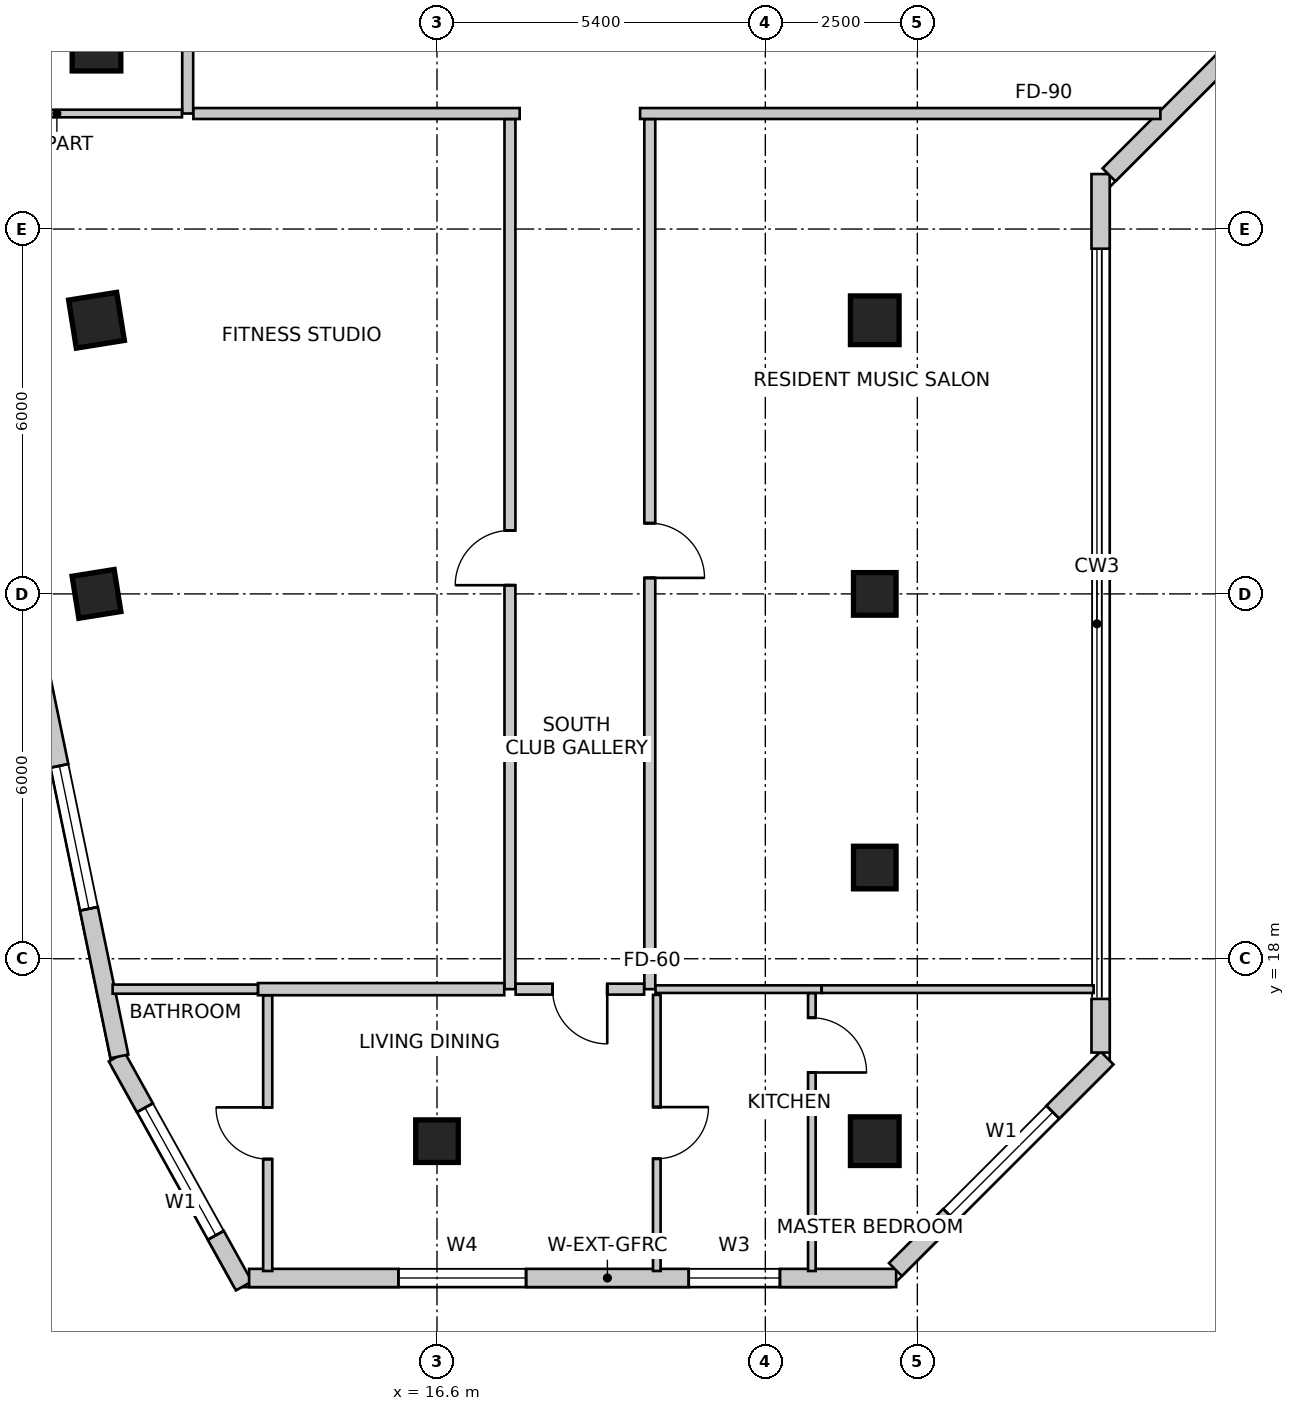
"""IFC4 building model, lengths in metres.
Left out: names, types, materials, properties, quantities, classifications, styles, units other than length and angle.
Written with IfcOpenShell. Run it as: python <this file> out.ifc"""

import sys

from ifc_helpers import new_model, si_unit, direction, frame, frame_2d, origin, origin_2d, place, context, subcontext, project, spatial, rectangle, extrude, source, transform, mapped, element, fill, save


model = new_model("IFC4")
c1 = context("Model", 3, precision=1e-05, world=origin(), true_north=direction((0.0, 1.0)))
c2 = subcontext(c1, "Body", "Model", "MODEL_VIEW")
j1 = project(units=[si_unit("LENGTHUNIT", "METRE"), si_unit("PLANEANGLEUNIT", "RADIAN")], contexts=[c1])
p1 = place(None, origin())
s1 = spatial("IfcSite", under=j1, at=p1, CompositionType="ELEMENT")
p2 = place(p1, origin())
s2 = spatial("IfcBuilding", under=s1, at=p2, CompositionType="ELEMENT")
p3 = place(p2, frame((0.0, 0.0, 232.4)))
s3 = spatial("IfcBuildingStorey", under=s2, at=p3, CompositionType="ELEMENT", Elevation=232.4)
m1 = source(origin(), c2, "Body", "SweptSolid", [
    extrude(rectangle(XDim=0.8, YDim=0.8, at=origin_2d()), origin(), (0.0, 0.0, 1.0), 3.5),
])
for number, where, z_axis, x_axis in (
    (1, (11.0, 33.0, 0.0), (0.0, 0.0, 1.0), (1.0, 0.0, 0.0)),
    (2, (11.0, 28.5, 0.0), (0.0, 0.0, 1.0), (0.158, -0.987, 0.0)),
):
    element("IfcColumn", number, at=place(p3, frame(where, z_axis=z_axis, x_axis=x_axis)), inside=s3, PredefinedType="COLUMN", context=c2, shape_type="MappedRepresentation", body=[
        mapped(m1, transform((0.0, 0.0, 0.0), scale=1.0)),
    ])
m2 = source(origin(), c2, "Body", "SweptSolid", [
    extrude(rectangle(XDim=0.7, YDim=0.7, at=origin_2d()), origin(), (0.0, 0.0, 1.0), 3.5),
])
p4 = place(p3, frame((11.0, 24.0, 0.0), z_axis=(0.0, 0.0, 1.0), x_axis=(0.158158067254, -0.987413806751, 0.0)))
e3 = element("IfcColumn", 3, at=p4, inside=s3, PredefinedType="COLUMN", context=c2, shape_type="MappedRepresentation", body=[
    mapped(m2, transform((0.0, 0.0, 0.0), scale=1.0)),
])
p5 = place(p3, frame((23.8, 28.5, 0.0), z_axis=(0.0, 0.0, 1.0), x_axis=(1.0, 0.0, 0.0)))
e4 = element("IfcColumn", 4, at=p5, inside=s3, PredefinedType="COLUMN", context=c2, shape_type="MappedRepresentation", body=[
    mapped(m1, transform((0.0, 0.0, 0.0), scale=1.0)),
])
for number, where, z_axis, x_axis in (
    (5, (23.8, 24.0, 0.0), (0.0, 0.0, 1.0), (1.0, 0.0, 0.0)),
    (6, (23.8, 19.5, 0.0), (0.0, 0.0, 1.0), (1.0, 0.0, 0.0)),
):
    element("IfcColumn", number, at=place(p3, frame(where, z_axis=z_axis, x_axis=x_axis)), inside=s3, PredefinedType="COLUMN", context=c2, shape_type="MappedRepresentation", body=[
        mapped(m2, transform((0.0, 0.0, 0.0), scale=1.0)),
    ])
p6 = place(p3, frame((23.8, 15.0, 0.0), z_axis=(0.0, 0.0, 1.0), x_axis=(1.0, 0.0, 0.0)))
e7 = element("IfcColumn", 7, at=p6, inside=s3, PredefinedType="COLUMN", context=c2, shape_type="MappedRepresentation", body=[
    mapped(m1, transform((0.0, 0.0, 0.0), scale=1.0)),
])
p7 = place(p3, frame((16.6, 15.0, 0.0), z_axis=(0.0, 0.0, 1.0), x_axis=(1.0, 0.0, 0.0)))
e8 = element("IfcColumn", 8, at=p7, inside=s3, PredefinedType="COLUMN", context=c2, shape_type="MappedRepresentation", body=[
    mapped(m2, transform((0.0, 0.0, 0.0), scale=1.0)),
])
p8 = place(p3, frame((11.333, 16.384, 0.0), z_axis=(0.0, 0.0, 1.0), x_axis=(0.485633305139, -0.874162623852, 0.0)))
e9 = element("IfcWall", 9, at=p8, inside=s3, PredefinedType="SOLIDWALL", context=c2, shape_type="SweptSolid", body=[
    extrude(rectangle(XDim=4.307, YDim=0.3, at=frame_2d((2.153, 0.0))), origin(), (0.0, 0.0, 1.0), 3.25),
])
m3 = source(origin(), c2, "Body", "SweptSolid", [
    extrude(rectangle(XDim=2.4, YDim=2.2, at=frame_2d((1.2, 1.1))), frame((0.0, 0.16, 0.0), z_axis=(0.0, -1.0, 0.0), x_axis=(1.0, 0.0, 0.0)), (0.0, 0.0, 1.0), 0.32),
])
p9 = place(p8, frame((0.954, 0.0, 0.85)))
e10 = element("IfcOpeningElement", 10, at=p9, cuts=e9, PredefinedType="OPENING", context=c2, shape_type="MappedRepresentation", body=[
    mapped(m3, transform((0.0, 0.0, 0.0), scale=1.0)),
])
p10 = place(p3, frame((13.51, 12.75, 0.0), z_axis=(0.0, 0.0, 1.0), x_axis=(1.0, 0.0, 0.0)))
e11 = element("IfcWall", 11, at=p10, inside=s3, PredefinedType="SOLIDWALL", context=c2, shape_type="SweptSolid", body=[
    extrude(rectangle(XDim=10.642, YDim=0.3, at=frame_2d((5.321, 0.0))), origin(), (0.0, 0.0, 1.0), 3.25),
])
m4 = source(origin(), c2, "Body", "SweptSolid", [
    extrude(rectangle(XDim=2.1, YDim=2.0, at=frame_2d((1.05, 1.0))), frame((0.0, 0.16, 0.0), z_axis=(0.0, -1.0, 0.0), x_axis=(1.0, 0.0, 0.0)), (0.0, 0.0, 1.0), 0.32),
])
p11 = place(p10, frame((2.455, 0.0, 0.85)))
e12 = element("IfcOpeningElement", 12, at=p11, cuts=e11, PredefinedType="OPENING", context=c2, shape_type="MappedRepresentation", body=[
    mapped(m4, transform((0.0, 0.0, 0.0), scale=1.0)),
])
m5 = source(origin(), c2, "Body", "SweptSolid", [
    extrude(rectangle(XDim=1.5, YDim=1.8, at=frame_2d((0.75, 0.9))), frame((0.0, 0.16, 0.0), z_axis=(0.0, -1.0, 0.0), x_axis=(1.0, 0.0, 0.0)), (0.0, 0.0, 1.0), 0.32),
])
p12 = place(p10, frame((7.23, 0.0, 0.85)))
e13 = element("IfcOpeningElement", 13, at=p12, cuts=e11, PredefinedType="OPENING", context=c2, shape_type="MappedRepresentation", body=[
    mapped(m5, transform((0.0, 0.0, 0.0), scale=1.0)),
])
p13 = place(p3, frame((24.14, 12.888, 0.0), z_axis=(0.0, 0.0, 1.0), x_axis=(0.707106781187, 0.707106781187, 0.0)))
e14 = element("IfcWall", 14, at=p13, inside=s3, PredefinedType="SOLIDWALL", context=c2, shape_type="SweptSolid", body=[
    extrude(rectangle(XDim=4.922, YDim=0.3, at=frame_2d((2.461, 0.0))), origin(), (0.0, 0.0, 1.0), 3.25),
])
p14 = place(p13, frame((1.261, 0.0, 0.85)))
e15 = element("IfcOpeningElement", 15, at=p14, cuts=e14, PredefinedType="OPENING", context=c2, shape_type="MappedRepresentation", body=[
    mapped(m3, transform((0.0, 0.0, 0.0), scale=1.0)),
])
p15 = place(p3, frame((27.514, 16.457, 0.0), z_axis=(0.0, 0.0, 1.0), x_axis=(0.0, 1.0, 0.0)))
e16 = element("IfcWall", 16, at=p15, inside=s3, PredefinedType="SOLIDWALL", context=c2, shape_type="SweptSolid", body=[
    extrude(rectangle(XDim=0.882, YDim=0.3, at=frame_2d((0.441, 0.0))), origin(), (0.0, 0.0, 1.0), 3.25),
])
p16 = place(p3, frame((27.514, 29.677, 0.0), z_axis=(0.0, 0.0, 1.0), x_axis=(0.0, 1.0, 0.0)))
e17 = element("IfcWall", 17, at=p16, inside=s3, PredefinedType="SOLIDWALL", context=c2, shape_type="SweptSolid", body=[
    extrude(rectangle(XDim=1.228, YDim=0.3, at=frame_2d((0.614, 0.0))), origin(), (0.0, 0.0, 1.0), 3.25),
])
p17 = place(p3, frame((27.652, 30.892, 0.0), z_axis=(0.0, 0.0, 1.0), x_axis=(0.707106781187, 0.707106781187, 0.0)))
e18 = element("IfcWall", 18, at=p17, inside=s3, PredefinedType="SOLIDWALL", context=c2, shape_type="SweptSolid", body=[
    extrude(rectangle(XDim=2.907, YDim=0.3, at=frame_2d((1.454, 0.0))), origin(), (0.0, 0.0, 1.0), 3.25),
])
p18 = place(p3, frame((13.269, 47.134, 0.0), z_axis=(0.0, 0.0, 1.0), x_axis=(-0.319920776449, -0.947444297464, 0.0)))
e19 = element("IfcWall", 19, at=p18, inside=s3, PredefinedType="SOLIDWALL", context=c2, shape_type="SweptSolid", body=[
    extrude(rectangle(XDim=16.133, YDim=0.3, at=frame_2d((8.067, 0.0))), origin(), (0.0, 0.0, 1.0), 3.25),
])
p19 = place(p18, frame((2.513, 0.0, 0.85)))
e20 = element("IfcOpeningElement", 20, at=p19, cuts=e19, PredefinedType="OPENING", context=c2, shape_type="MappedRepresentation", body=[
    mapped(m4, transform((0.0, 0.0, 0.0), scale=1.0)),
])
p20 = place(p18, frame((7.26, 0.0, 0.85)))
e21 = element("IfcOpeningElement", 21, at=p20, cuts=e19, PredefinedType="OPENING", context=c2, shape_type="MappedRepresentation", body=[
    mapped(m3, transform((0.0, 0.0, 0.0), scale=1.0)),
])
p21 = place(p18, frame((12.307, 0.0, 0.85)))
e22 = element("IfcOpeningElement", 22, at=p21, cuts=e19, PredefinedType="OPENING", context=c2, shape_type="MappedRepresentation", body=[
    mapped(m4, transform((0.0, 0.0, 0.0), scale=1.0)),
])
p22 = place(p3, frame((8.188, 31.834, 0.0), z_axis=(0.0, 0.0, 1.0), x_axis=(0.202303475707, -0.979322880217, 0.0)))
e23 = element("IfcWall", 23, at=p22, inside=s3, PredefinedType="SOLIDWALL", context=c2, shape_type="SweptSolid", body=[
    extrude(rectangle(XDim=15.766, YDim=0.3, at=frame_2d((7.883, 0.0))), origin(), (0.0, 0.0, 1.0), 3.25),
])
p23 = place(p22, frame((1.473, 0.0, 0.85)))
e24 = element("IfcOpeningElement", 24, at=p23, cuts=e23, PredefinedType="OPENING", context=c2, shape_type="MappedRepresentation", body=[
    mapped(m3, transform((0.0, 0.0, 0.0), scale=1.0)),
])
p24 = place(p22, frame((6.33, 0.0, 0.85)))
e25 = element("IfcOpeningElement", 25, at=p24, cuts=e23, PredefinedType="OPENING", context=c2, shape_type="MappedRepresentation", body=[
    mapped(m4, transform((0.0, 0.0, 0.0), scale=1.0)),
])
p25 = place(p22, frame((10.887, 0.0, 0.85)))
e26 = element("IfcOpeningElement", 26, at=p25, cuts=e23, PredefinedType="OPENING", context=c2, shape_type="MappedRepresentation", body=[
    mapped(m3, transform((0.0, 0.0, 0.0), scale=1.0)),
])
p26 = place(p3, frame((12.5, 31.9, 0.0), z_axis=(0.0, 0.0, 1.0), x_axis=(0.0, 1.0, 0.0)))
e27 = element("IfcWall", 27, at=p26, inside=s3, PredefinedType="PARTITIONING", context=c2, shape_type="SweptSolid", body=[
    extrude(rectangle(XDim=1.556, YDim=0.18, at=frame_2d((0.778, 0.0))), origin(), (0.0, 0.0, 1.0), 2.934),
])
p27 = place(p3, frame((17.96, 31.9, 0.0), z_axis=(0.0, 0.0, 1.0), x_axis=(-1.0, 0.0, 0.0)))
e28 = element("IfcWall", 28, at=p27, inside=s3, PredefinedType="PARTITIONING", context=c2, shape_type="SweptSolid", body=[
    extrude(rectangle(XDim=5.366, YDim=0.18, at=frame_2d((2.683, 0.0))), origin(), (0.0, 0.0, 1.0), 2.934),
])
p28 = place(p3, frame((28.497, 31.9, 0.0), z_axis=(0.0, 0.0, 1.0), x_axis=(-1.0, 0.0, 0.0)))
e29 = element("IfcWall", 29, at=p28, inside=s3, PredefinedType="PARTITIONING", context=c2, shape_type="SweptSolid", body=[
    extrude(rectangle(XDim=8.557, YDim=0.18, at=frame_2d((4.279, 0.0))), origin(), (0.0, 0.0, 1.0), 2.934),
])
p29 = place(p3, frame((12.406, 31.9, 0.0), z_axis=(0.0, 0.0, 1.0), x_axis=(-1.0, 0.0, 0.0)))
e30 = element("IfcWall", 30, at=p29, inside=s3, PredefinedType="PARTITIONING", context=c2, shape_type="SweptSolid", body=[
    extrude(rectangle(XDim=4.115, YDim=0.125, at=frame_2d((2.057, 0.0))), origin(), (0.0, 0.0, 1.0), 2.542),
])
p30 = place(p3, frame((17.8, 17.5, 0.0), z_axis=(0.0, 0.0, 1.0), x_axis=(0.0, 1.0, 0.0)))
e31 = element("IfcWall", 31, at=p30, inside=s3, PredefinedType="PARTITIONING", context=c2, shape_type="SweptSolid", body=[
    extrude(rectangle(XDim=14.306, YDim=0.18, at=frame_2d((7.153, 0.0))), origin(), (0.0, 0.0, 1.0), 2.766),
])
m6 = source(origin(), c2, "Body", "SweptSolid", [
    extrude(rectangle(XDim=0.9, YDim=2.15, at=frame_2d((0.45, 1.075))), frame((0.0, 0.1, 0.0), z_axis=(0.0, -1.0, 0.0), x_axis=(1.0, 0.0, 0.0)), (0.0, 0.0, 1.0), 0.2),
])
p31 = place(p30, frame((6.643, 0.0, 0.0)))
e32 = element("IfcOpeningElement", 32, at=p31, cuts=e31, PredefinedType="OPENING", context=c2, shape_type="MappedRepresentation", body=[
    mapped(m6, transform((0.0, 0.0, 0.0), scale=1.0)),
])
p32 = place(p3, frame((20.1, 31.806, 0.0), z_axis=(0.0, 0.0, 1.0), x_axis=(0.0, -1.0, 0.0)))
e33 = element("IfcWall", 33, at=p32, inside=s3, PredefinedType="PARTITIONING", context=c2, shape_type="SweptSolid", body=[
    extrude(rectangle(XDim=14.306, YDim=0.18, at=frame_2d((7.153, 0.0))), origin(), (0.0, 0.0, 1.0), 2.766),
])
p33 = place(p32, frame((6.643, 0.0, 0.0)))
e34 = element("IfcOpeningElement", 34, at=p33, cuts=e33, PredefinedType="OPENING", context=c2, shape_type="MappedRepresentation", body=[
    mapped(m6, transform((0.0, 0.0, 0.0), scale=1.0)),
])
p34 = place(p3, frame((20.006, 17.5, 0.0), z_axis=(0.0, 0.0, 1.0), x_axis=(-1.0, 0.0, 0.0)))
e35 = element("IfcWall", 35, at=p34, inside=s3, PredefinedType="PARTITIONING", context=c2, shape_type="SweptSolid", body=[
    extrude(rectangle(XDim=2.112, YDim=0.18, at=frame_2d((1.056, 0.0))), origin(), (0.0, 0.0, 1.0), 3.25),
])
p35 = place(p34, frame((0.606, 0.0, 0.0)))
e36 = element("IfcOpeningElement", 36, at=p35, cuts=e35, PredefinedType="OPENING", context=c2, shape_type="MappedRepresentation", body=[
    mapped(m6, transform((0.0, 0.0, 0.0), scale=1.0)),
])
p36 = place(p3, frame((17.706, 17.5, 0.0), z_axis=(0.0, 0.0, 1.0), x_axis=(-1.0, 0.0, 0.0)))
e37 = element("IfcWall", 37, at=p36, inside=s3, PredefinedType="PARTITIONING", context=c2, shape_type="SweptSolid", body=[
    extrude(rectangle(XDim=4.05, YDim=0.2, at=frame_2d((2.025, 0.0))), origin(), (0.0, 0.0, 1.0), 3.25),
])
p37 = place(p3, frame((13.654, 17.5, 0.0), z_axis=(0.0, 0.0, 1.0), x_axis=(-1.0, 0.0, 0.0)))
e38 = element("IfcWall", 38, at=p37, inside=s3, PredefinedType="PARTITIONING", context=c2, shape_type="SweptSolid", body=[
    extrude(rectangle(XDim=2.388, YDim=0.15, at=frame_2d((1.194, 0.0))), origin(), (0.0, 0.0, 1.0), 3.25),
])
p38 = place(p3, frame((22.925, 17.5, 0.0), z_axis=(0.0, 0.0, 1.0), x_axis=(-1.0, 0.0, 0.0)))
e39 = element("IfcWall", 39, at=p38, inside=s3, PredefinedType="PARTITIONING", context=c2, shape_type="SweptSolid", body=[
    extrude(rectangle(XDim=2.731, YDim=0.125, at=frame_2d((1.365, 0.0))), origin(), (0.0, 0.0, 1.0), 2.822),
])
p39 = place(p3, frame((27.399, 17.5, 0.0), z_axis=(0.0, 0.0, 1.0), x_axis=(-1.0, 0.0, 0.0)))
e40 = element("IfcWall", 40, at=p39, inside=s3, PredefinedType="PARTITIONING", context=c2, shape_type="SweptSolid", body=[
    extrude(rectangle(XDim=4.472, YDim=0.125, at=frame_2d((2.236, 0.0))), origin(), (0.0, 0.0, 1.0), 2.542),
])
p40 = place(p3, frame((13.816, 12.865, 0.0), z_axis=(0.0, 0.0, 1.0), x_axis=(0.0, 1.0, 0.0)))
e41 = element("IfcWall", 41, at=p40, inside=s3, PredefinedType="PARTITIONING", context=c2, shape_type="SweptSolid", body=[
    extrude(rectangle(XDim=4.531, YDim=0.15, at=frame_2d((2.266, 0.0))), origin(), (0.0, 0.0, 1.0), 3.25),
])
m7 = source(origin(), c2, "Body", "SweptSolid", [
    extrude(rectangle(XDim=0.85, YDim=2.15, at=frame_2d((0.425, 1.075))), frame((0.0, 0.085, 0.0), z_axis=(0.0, -1.0, 0.0), x_axis=(1.0, 0.0, 0.0)), (0.0, 0.0, 1.0), 0.17),
])
p41 = place(p40, frame((1.841, 0.0, 0.0)))
e42 = element("IfcOpeningElement", 42, at=p41, cuts=e41, PredefinedType="OPENING", context=c2, shape_type="MappedRepresentation", body=[
    mapped(m7, transform((0.0, 0.0, 0.0), scale=1.0)),
])
p42 = place(p3, frame((20.215, 17.406, 0.0), z_axis=(0.0, 0.0, 1.0), x_axis=(0.0, -1.0, 0.0)))
e43 = element("IfcWall", 43, at=p42, inside=s3, PredefinedType="PARTITIONING", context=c2, shape_type="SweptSolid", body=[
    extrude(rectangle(XDim=4.541, YDim=0.125, at=frame_2d((2.271, 0.0))), origin(), (0.0, 0.0, 1.0), 2.542),
])
m8 = source(origin(), c2, "Body", "SweptSolid", [
    extrude(rectangle(XDim=0.85, YDim=2.15, at=frame_2d((0.425, 1.075))), frame((0.0, 0.073, 0.0), z_axis=(0.0, -1.0, 0.0), x_axis=(1.0, 0.0, 0.0)), (0.0, 0.0, 1.0), 0.145),
])
p43 = place(p42, frame((1.845, 0.0, 0.0)))
e44 = element("IfcOpeningElement", 44, at=p43, cuts=e43, PredefinedType="OPENING", context=c2, shape_type="MappedRepresentation", body=[
    mapped(m8, transform((0.0, 0.0, 0.0), scale=1.0)),
])
p44 = place(p3, frame((22.765, 17.434, 0.0), z_axis=(0.0, 0.0, 1.0), x_axis=(0.0, -1.0, 0.0)))
e45 = element("IfcWall", 45, at=p44, inside=s3, PredefinedType="PARTITIONING", context=c2, shape_type="SweptSolid", body=[
    extrude(rectangle(XDim=4.569, YDim=0.125, at=frame_2d((2.284, 0.0))), origin(), (0.0, 0.0, 1.0), 2.542),
])
m9 = source(origin(), c2, "Body", "SweptSolid", [
    extrude(rectangle(XDim=0.9, YDim=2.15, at=frame_2d((0.45, 1.075))), frame((0.0, 0.073, 0.0), z_axis=(0.0, -1.0, 0.0), x_axis=(1.0, 0.0, 0.0)), (0.0, 0.0, 1.0), 0.145),
])
p45 = place(p44, frame((0.404, 0.0, 0.0)))
e46 = element("IfcOpeningElement", 46, at=p45, cuts=e45, PredefinedType="OPENING", context=c2, shape_type="MappedRepresentation", body=[
    mapped(m9, transform((0.0, 0.0, 0.0), scale=1.0)),
])
m10 = source(origin(), c2, "Body", "SweptSolid", [
    extrude(rectangle(XDim=2.4, YDim=2.2, at=frame_2d((1.2, 1.1))), frame((0.0, -0.015, 0.0), z_axis=(0.0, -1.0, 0.0), x_axis=(1.0, 0.0, 0.0)), (0.0, 0.0, 1.0), 0.06),
])
p46 = place(p9, origin())
e47 = element("IfcWindow", 47, at=p46, inside=s3, PartitioningType="SINGLE_PANEL", PredefinedType="WINDOW", context=c2, shape_type="MappedRepresentation", body=[
    mapped(m10, transform((0.0, 0.0, 0.0), scale=1.0)),
])
fill(e10, e47)
m11 = source(origin(), c2, "Body", "SweptSolid", [
    extrude(rectangle(XDim=2.1, YDim=2.0, at=frame_2d((1.05, 1.0))), frame((0.0, -0.015, 0.0), z_axis=(0.0, -1.0, 0.0), x_axis=(1.0, 0.0, 0.0)), (0.0, 0.0, 1.0), 0.06),
])
p47 = place(p11, origin())
e48 = element("IfcWindow", 48, at=p47, inside=s3, PartitioningType="SINGLE_PANEL", PredefinedType="WINDOW", context=c2, shape_type="MappedRepresentation", body=[
    mapped(m11, transform((0.0, 0.0, 0.0), scale=1.0)),
])
fill(e12, e48)
m12 = source(origin(), c2, "Body", "SweptSolid", [
    extrude(rectangle(XDim=1.5, YDim=1.8, at=frame_2d((0.75, 0.9))), frame((0.0, -0.015, 0.0), z_axis=(0.0, -1.0, 0.0), x_axis=(1.0, 0.0, 0.0)), (0.0, 0.0, 1.0), 0.06),
])
p48 = place(p12, origin())
e49 = element("IfcWindow", 49, at=p48, inside=s3, PartitioningType="SINGLE_PANEL", PredefinedType="WINDOW", context=c2, shape_type="MappedRepresentation", body=[
    mapped(m12, transform((0.0, 0.0, 0.0), scale=1.0)),
])
fill(e13, e49)
p49 = place(p14, origin())
e50 = element("IfcWindow", 50, at=p49, inside=s3, PartitioningType="SINGLE_PANEL", PredefinedType="WINDOW", context=c2, shape_type="MappedRepresentation", body=[
    mapped(m10, transform((0.0, 0.0, 0.0), scale=1.0)),
])
fill(e15, e50)
p50 = place(p25, origin())
e51 = element("IfcWindow", 51, at=p50, inside=s3, PartitioningType="SINGLE_PANEL", PredefinedType="WINDOW", context=c2, shape_type="MappedRepresentation", body=[
    mapped(m10, transform((0.0, 0.0, 0.0), scale=1.0)),
])
fill(e26, e51)
m13 = source(origin(), c2, "Body", "SweptSolid", [
    extrude(rectangle(XDim=0.9, YDim=2.15, at=frame_2d((0.45, 1.075))), frame((0.0, 0.025, 0.0), z_axis=(0.0, -1.0, 0.0), x_axis=(1.0, 0.0, 0.0)), (0.0, 0.0, 1.0), 0.05),
])
p51 = place(p31, origin())
e52 = element("IfcDoor", 52, at=p51, inside=s3, OperationType="SINGLE_SWING_LEFT", PredefinedType="DOOR", context=c2, shape_type="MappedRepresentation", body=[
    mapped(m13, transform((0.0, 0.0, 0.0), scale=1.0)),
])
fill(e32, e52)
p52 = place(p33, origin())
e53 = element("IfcDoor", 53, at=p52, inside=s3, OperationType="SINGLE_SWING_RIGHT", PredefinedType="DOOR", context=c2, shape_type="MappedRepresentation", body=[
    mapped(m13, transform((0.0, 0.0, 0.0), scale=1.0)),
])
fill(e34, e53)
m14 = source(origin(), c2, "Body", "SweptSolid", [
    extrude(rectangle(XDim=0.9, YDim=2.15, at=frame_2d((0.45, 1.075))), frame((0.0, 0.025, 0.0), z_axis=(0.0, -1.0, 0.0), x_axis=(1.0, 0.0, 0.0)), (0.0, 0.0, 1.0), 0.05),
])
p53 = place(p35, origin())
e54 = element("IfcDoor", 54, at=p53, inside=s3, OperationType="SINGLE_SWING_LEFT", PredefinedType="DOOR", context=c2, shape_type="MappedRepresentation", body=[
    mapped(m14, transform((0.0, 0.0, 0.0), scale=1.0)),
])
fill(e36, e54)
m15 = source(origin(), c2, "Body", "SweptSolid", [
    extrude(rectangle(XDim=0.85, YDim=2.15, at=frame_2d((0.425, 1.075))), frame((0.0, 0.025, 0.0), z_axis=(0.0, -1.0, 0.0), x_axis=(1.0, 0.0, 0.0)), (0.0, 0.0, 1.0), 0.05),
])
p54 = place(p41, origin())
e55 = element("IfcDoor", 55, at=p54, inside=s3, OperationType="SINGLE_SWING_RIGHT", PredefinedType="DOOR", context=c2, shape_type="MappedRepresentation", body=[
    mapped(m15, transform((0.0, 0.0, 0.0), scale=1.0)),
])
fill(e42, e55)
p55 = place(p43, origin())
e56 = element("IfcDoor", 56, at=p55, inside=s3, OperationType="SINGLE_SWING_LEFT", PredefinedType="DOOR", context=c2, shape_type="MappedRepresentation", body=[
    mapped(m15, transform((0.0, 0.0, 0.0), scale=1.0)),
])
fill(e44, e56)
p56 = place(p45, origin())
e57 = element("IfcDoor", 57, at=p56, inside=s3, OperationType="SINGLE_SWING_RIGHT", PredefinedType="DOOR", context=c2, shape_type="MappedRepresentation", body=[
    mapped(m13, transform((0.0, 0.0, 0.0), scale=1.0)),
])
fill(e46, e57)
save(model, sys.argv[1])
